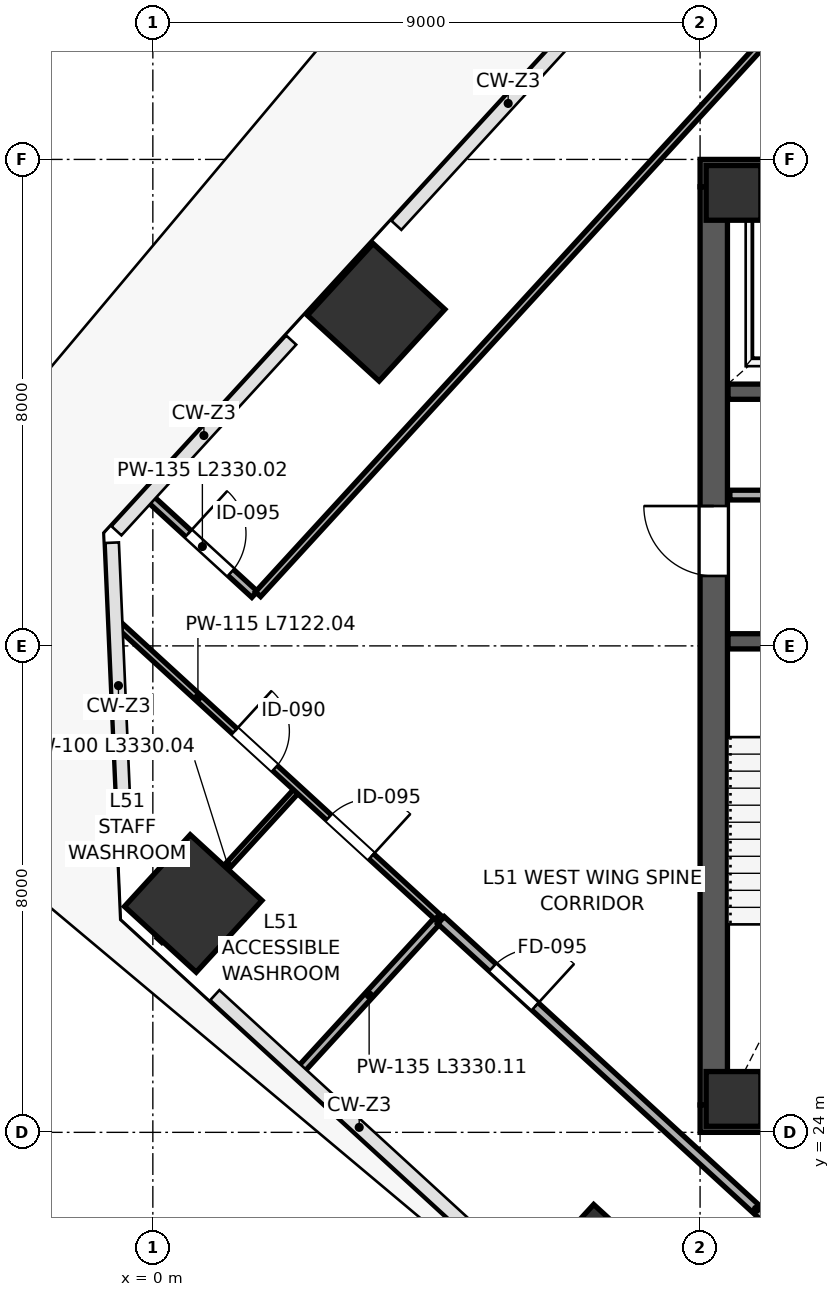
"""IFC4 building model, lengths in metres.
Left out: names, types, materials, properties, quantities, classifications, styles, units other than length and angle.
Written with IfcOpenShell. Run it as: python <this file> out.ifc"""

import sys

from ifc_helpers import new_model, si_unit, direction, frame, frame_2d, origin, origin_2d, place, context, subcontext, project, spatial, rectangle, extrude, source, transform, mapped, element, fill, save


model = new_model("IFC4")
c1 = context("Model", 3, precision=1e-05, world=origin(), true_north=direction((0.0, 1.0)))
c2 = subcontext(c1, "Body", "Model", "MODEL_VIEW")
j1 = project(units=[si_unit("LENGTHUNIT", "METRE"), si_unit("PLANEANGLEUNIT", "RADIAN")], contexts=[c1])
p1 = place(None, origin())
s1 = spatial("IfcSite", under=j1, at=p1, CompositionType="ELEMENT")
p2 = place(p1, origin())
s2 = spatial("IfcBuilding", under=s1, at=p2, CompositionType="ELEMENT")
p3 = place(p2, frame((0.0, 0.0, 229.0)))
s3 = spatial("IfcBuildingStorey", under=s2, at=p3, CompositionType="ELEMENT", Elevation=229.0)
m1 = source(origin(), c2, "Body", "SweptSolid", [
    extrude(rectangle(XDim=0.9, YDim=0.9, at=origin_2d()), origin(), (0.0, 0.0, 1.0), 4.198),
])
for number, where, z_axis, x_axis in (
    (1, (9.55, 24.55, 0.001), (0.0, 0.0, 1.0), (1.0, 0.0, 0.0)),
    (2, (9.55, 39.45, 0.001), (0.0, 0.0, 1.0), (1.0, 0.0, 0.0)),
):
    element("IfcColumn", number, at=place(p3, frame(where, z_axis=z_axis, x_axis=x_axis)), inside=s3, PredefinedType="COLUMN", context=c2, shape_type="MappedRepresentation", body=[
        mapped(m1, transform((0.0, 0.0, 0.0), scale=1.0)),
    ])
m2 = source(origin(), c2, "Body", "SweptSolid", [
    extrude(rectangle(XDim=1.6, YDim=1.6, at=origin_2d()), origin(), (0.0, 0.0, 1.0), 4.198),
])
for number, where, z_axis, x_axis in (
    (3, (0.664, 27.764, 0.001), (0.0, 0.0, 1.0), (-0.737, 0.676, 0.0)),
    (4, (7.299, 21.683, 0.001), (0.0, 0.0, 1.0), (-0.737, 0.676, 0.0)),
    (5, (3.672, 37.486, 0.001), (0.0, 0.0, 1.0), (-0.737, 0.676, 0.0)),
):
    element("IfcColumn", number, at=place(p3, frame(where, z_axis=z_axis, x_axis=x_axis)), inside=s3, PredefinedType="COLUMN", context=c2, shape_type="MappedRepresentation", body=[
        mapped(m2, transform((0.0, 0.0, 0.0), scale=1.0)),
    ])
p4 = place(p3, frame((9.225, 24.45, 0.0), z_axis=(0.0, 0.0, 1.0), x_axis=(0.0, 1.0, 0.0)))
e6 = element("IfcWall", 6, at=p4, inside=s3, PredefinedType="SHEAR", context=c2, shape_type="SweptSolid", body=[
    extrude(rectangle(XDim=15.1, YDim=0.45, at=frame_2d((7.55, 0.0))), origin(), (0.0, 0.0, 1.0), 3.96),
])
p5 = place(p4, frame((8.7, 0.0, 0.0)))
e7 = element("IfcOpeningElement", 7, at=p5, cuts=e6, PredefinedType="OPENING", context=c2, shape_type="SweptSolid", body=[
    extrude(rectangle(XDim=1.15, YDim=2.2, at=frame_2d((0.575, 1.1))), frame((0.0, 0.235, 0.0), z_axis=(0.0, -1.0, 0.0), x_axis=(1.0, 0.0, 0.0)), (0.0, 0.0, 1.0), 0.47),
])
for number, where, z_axis, x_axis in (
    (8, (9.0, 24.225, 0.0), (0.0, 0.0, 1.0), (1.0, 0.0, 0.0)),
    (9, (9.0, 39.775, 0.0), (0.0, 0.0, 1.0), (1.0, 0.0, 0.0)),
):
    element("IfcWall", number, at=place(p3, frame(where, z_axis=z_axis, x_axis=x_axis)), inside=s3, PredefinedType="SHEAR", context=c2, shape_type="SweptSolid", body=[
        extrude(rectangle(XDim=18.0, YDim=0.45, at=frame_2d((9.0, 0.0))), origin(), (0.0, 0.0, 1.0), 3.96),
    ])
p6 = place(p3, frame((9.46, 32.075, 0.0), z_axis=(0.0, 0.0, 1.0), x_axis=(1.0, 0.0, 0.0)))
e10 = element("IfcWall", 10, at=p6, inside=s3, PredefinedType="SHEAR", context=c2, shape_type="SweptSolid", body=[
    extrude(rectangle(XDim=3.29, YDim=0.25, at=frame_2d((1.645, 0.0))), origin(), (0.0, 0.0, 1.0), 3.96),
])
p7 = place(p3, frame((9.46, 36.18, 0.0), z_axis=(0.0, 0.0, 1.0), x_axis=(1.0, 0.0, 0.0)))
e11 = element("IfcWall", 11, at=p7, inside=s3, PredefinedType="SHEAR", context=c2, shape_type="SweptSolid", body=[
    extrude(rectangle(XDim=3.79, YDim=0.25, at=frame_2d((1.895, 0.0))), origin(), (0.0, 0.0, 1.0), 3.96),
])
p8 = place(p7, frame((2.62, 0.0, 0.0)))
e12 = element("IfcOpeningElement", 12, at=p8, cuts=e11, PredefinedType="OPENING", context=c2, shape_type="SweptSolid", body=[
    extrude(rectangle(XDim=0.85, YDim=2.1, at=frame_2d((0.425, 1.05))), frame((0.0, 0.135, 0.0), z_axis=(0.0, -1.0, 0.0), x_axis=(1.0, 0.0, 0.0)), (0.0, 0.0, 1.0), 0.27),
])
p9 = place(p7, frame((0.85, 0.0, 0.0)))
e13 = element("IfcOpeningElement", 13, at=p9, cuts=e11, PredefinedType="OPENING", context=c2, shape_type="SweptSolid", body=[
    extrude(rectangle(XDim=1.3, YDim=2.25, at=frame_2d((0.65, 1.125))), frame((0.0, 0.135, 0.0), z_axis=(0.0, -1.0, 0.0), x_axis=(1.0, 0.0, 0.0)), (0.0, 0.0, 1.0), 0.27),
])
p10 = place(p3, frame((9.49, 34.48, 0.0), z_axis=(0.0, 0.0, 1.0), x_axis=(1.0, 0.0, 0.0)))
e14 = element("IfcWall", 14, at=p10, inside=s3, PredefinedType="PARTITIONING", context=c2, shape_type="SweptSolid", body=[
    extrude(rectangle(XDim=3.7, YDim=0.16, at=frame_2d((1.85, 0.0))), origin(), (0.0, 0.0, 1.0), 3.96),
])
p11 = place(p10, frame((1.15, 0.0, 0.0)))
e15 = element("IfcOpeningElement", 15, at=p11, cuts=e14, PredefinedType="OPENING", context=c2, shape_type="SweptSolid", body=[
    extrude(rectangle(XDim=0.9, YDim=2.15, at=frame_2d((0.45, 1.075))), frame((0.0, 0.09, 0.0), z_axis=(0.0, -1.0, 0.0), x_axis=(1.0, 0.0, 0.0)), (0.0, 0.0, 1.0), 0.18),
])
p12 = place(p3, frame((0.11, 27.159, 0.0), z_axis=(0.0, 0.0, 1.0), x_axis=(0.675605101048, 0.737263689217, 0.0)))
e16 = element("IfcWall", 16, at=p12, inside=s3, PredefinedType="PARTITIONING", context=c2, shape_type="SweptSolid", body=[
    extrude(rectangle(XDim=3.33, YDim=0.1, at=frame_2d((1.665, 0.0))), origin(), (0.0, 0.0, 1.0), 3.195),
])
p13 = place(p3, frame((2.432, 25.031, 0.0), z_axis=(0.0, 0.0, 1.0), x_axis=(0.675605101048, 0.737263689217, 0.0)))
e17 = element("IfcWall", 17, at=p13, inside=s3, PredefinedType="PARTITIONING", context=c2, shape_type="SweptSolid", body=[
    extrude(rectangle(XDim=3.33, YDim=0.135, at=frame_2d((1.665, 0.0))), origin(), (0.0, 0.0, 1.0), 3.195),
])
p14 = place(p3, frame((-0.571, 32.354, 0.0), z_axis=(0.0, 0.0, 1.0), x_axis=(0.737285035525, -0.675581805846, 0.0)))
e18 = element("IfcWall", 18, at=p14, inside=s3, PredefinedType="PARTITIONING", context=c2, shape_type="SweptSolid", body=[
    extrude(rectangle(XDim=7.122, YDim=0.115, at=frame_2d((3.561, 0.0))), origin(), (0.0, 0.0, 1.0), 3.96),
])
p15 = place(p14, frame((2.6, 0.0, 0.0)))
e19 = element("IfcOpeningElement", 19, at=p15, cuts=e18, PredefinedType="OPENING", context=c2, shape_type="SweptSolid", body=[
    extrude(rectangle(XDim=0.9, YDim=2.15, at=frame_2d((0.45, 1.075))), frame((0.0, 0.067, 0.0), z_axis=(0.0, -1.0, 0.0), x_axis=(1.0, 0.0, 0.0)), (0.0, 0.0, 1.0), 0.135),
])
p16 = place(p14, frame((4.7, 0.0, 0.0)))
e20 = element("IfcOpeningElement", 20, at=p16, cuts=e18, PredefinedType="OPENING", context=c2, shape_type="SweptSolid", body=[
    extrude(rectangle(XDim=0.95, YDim=2.15, at=frame_2d((0.475, 1.075))), frame((0.0, 0.067, 0.0), z_axis=(0.0, -1.0, 0.0), x_axis=(1.0, 0.0, 0.0)), (0.0, 0.0, 1.0), 0.135),
])
p17 = place(p3, frame((4.739, 27.489, 0.0), z_axis=(0.0, 0.0, 1.0), x_axis=(0.737276572642, -0.675591041558, 0.0)))
e21 = element("IfcWall", 21, at=p17, inside=s3, PredefinedType="PARTITIONING", context=c2, shape_type="SweptSolid", body=[
    extrude(rectangle(XDim=14.07, YDim=0.16, at=frame_2d((7.035, 0.0))), origin(), (0.0, 0.0, 1.0), 3.96),
])
p18 = place(p17, frame((1.15, 0.0, 0.0)))
e22 = element("IfcOpeningElement", 22, at=p18, cuts=e21, PredefinedType="OPENING", context=c2, shape_type="SweptSolid", body=[
    extrude(rectangle(XDim=0.95, YDim=2.15, at=frame_2d((0.475, 1.075))), frame((0.0, 0.09, 0.0), z_axis=(0.0, -1.0, 0.0), x_axis=(1.0, 0.0, 0.0)), (0.0, 0.0, 1.0), 0.18),
])
p19 = place(p3, frame((-0.044, 34.421, 0.0), z_axis=(0.0, 0.0, 1.0), x_axis=(0.73728894688, -0.675577537229, 0.0)))
e23 = element("IfcWall", 23, at=p19, inside=s3, PredefinedType="PARTITIONING", context=c2, shape_type="SweptSolid", body=[
    extrude(rectangle(XDim=2.33, YDim=0.135, at=frame_2d((1.165, 0.0))), origin(), (0.0, 0.0, 1.0), 3.96),
])
p20 = place(p19, frame((0.85, 0.0, 0.0)))
e24 = element("IfcOpeningElement", 24, at=p20, cuts=e23, PredefinedType="OPENING", context=c2, shape_type="SweptSolid", body=[
    extrude(rectangle(XDim=0.95, YDim=2.15, at=frame_2d((0.475, 1.075))), frame((0.0, 0.078, 0.0), z_axis=(0.0, -1.0, 0.0), x_axis=(1.0, 0.0, 0.0)), (0.0, 0.0, 1.0), 0.155),
])
p21 = place(p3, frame((1.73, 32.85, 0.0), z_axis=(0.0, 0.0, 1.0), x_axis=(0.675589845589, 0.737277668546, 0.0)))
e25 = element("IfcWall", 25, at=p21, inside=s3, PredefinedType="PARTITIONING", context=c2, shape_type="SweptSolid", body=[
    extrude(rectangle(XDim=26.742, YDim=0.115, at=frame_2d((13.371, 0.0))), origin(), (0.0, 0.0, 1.0), 3.96),
])
m3 = source(origin(), c2, "Body", "SweptSolid", [
    extrude(rectangle(XDim=1.15, YDim=2.2, at=frame_2d((0.575, 1.1))), frame((0.0, 0.025, 0.0), z_axis=(0.0, -1.0, 0.0), x_axis=(1.0, 0.0, 0.0)), (0.0, 0.0, 1.0), 0.05),
])
p22 = place(p5, origin())
e26 = element("IfcDoor", 26, at=p22, inside=s3, OperationType="SINGLE_SWING_RIGHT", PredefinedType="DOOR", context=c2, shape_type="MappedRepresentation", body=[
    mapped(m3, transform((0.0, 0.0, 0.0), scale=1.0)),
])
fill(e7, e26)
m4 = source(origin(), c2, "Body", "SweptSolid", [
    extrude(rectangle(XDim=0.9, YDim=2.15, at=frame_2d((0.45, 1.075))), frame((0.0, 0.025, 0.0), z_axis=(0.0, -1.0, 0.0), x_axis=(1.0, 0.0, 0.0)), (0.0, 0.0, 1.0), 0.05),
])
p23 = place(p15, origin())
e27 = element("IfcDoor", 27, at=p23, inside=s3, OperationType="SINGLE_SWING_LEFT", PredefinedType="DOOR", context=c2, shape_type="MappedRepresentation", body=[
    mapped(m4, transform((0.0, 0.0, 0.0), scale=1.0)),
])
fill(e19, e27)
m5 = source(origin(), c2, "Body", "SweptSolid", [
    extrude(rectangle(XDim=0.95, YDim=2.15, at=frame_2d((0.475, 1.075))), frame((0.0, 0.025, 0.0), z_axis=(0.0, -1.0, 0.0), x_axis=(1.0, 0.0, 0.0)), (0.0, 0.0, 1.0), 0.05),
])
p24 = place(p16, origin())
e28 = element("IfcDoor", 28, at=p24, inside=s3, OperationType="SINGLE_SWING_RIGHT", PredefinedType="DOOR", context=c2, shape_type="MappedRepresentation", body=[
    mapped(m5, transform((0.0, 0.0, 0.0), scale=1.0)),
])
fill(e20, e28)
m6 = source(origin(), c2, "Body", "SweptSolid", [
    extrude(rectangle(XDim=0.95, YDim=2.15, at=frame_2d((0.475, 1.075))), frame((0.0, 0.025, 0.0), z_axis=(0.0, -1.0, 0.0), x_axis=(1.0, 0.0, 0.0)), (0.0, 0.0, 1.0), 0.05),
])
p25 = place(p18, origin())
e29 = element("IfcDoor", 29, at=p25, inside=s3, OperationType="SINGLE_SWING_RIGHT", PredefinedType="DOOR", context=c2, shape_type="MappedRepresentation", body=[
    mapped(m6, transform((0.0, 0.0, 0.0), scale=1.0)),
])
fill(e22, e29)
p26 = place(p20, origin())
e30 = element("IfcDoor", 30, at=p26, inside=s3, OperationType="SINGLE_SWING_LEFT", PredefinedType="DOOR", context=c2, shape_type="MappedRepresentation", body=[
    mapped(m5, transform((0.0, 0.0, 0.0), scale=1.0)),
])
fill(e24, e30)
save(model, sys.argv[1])
